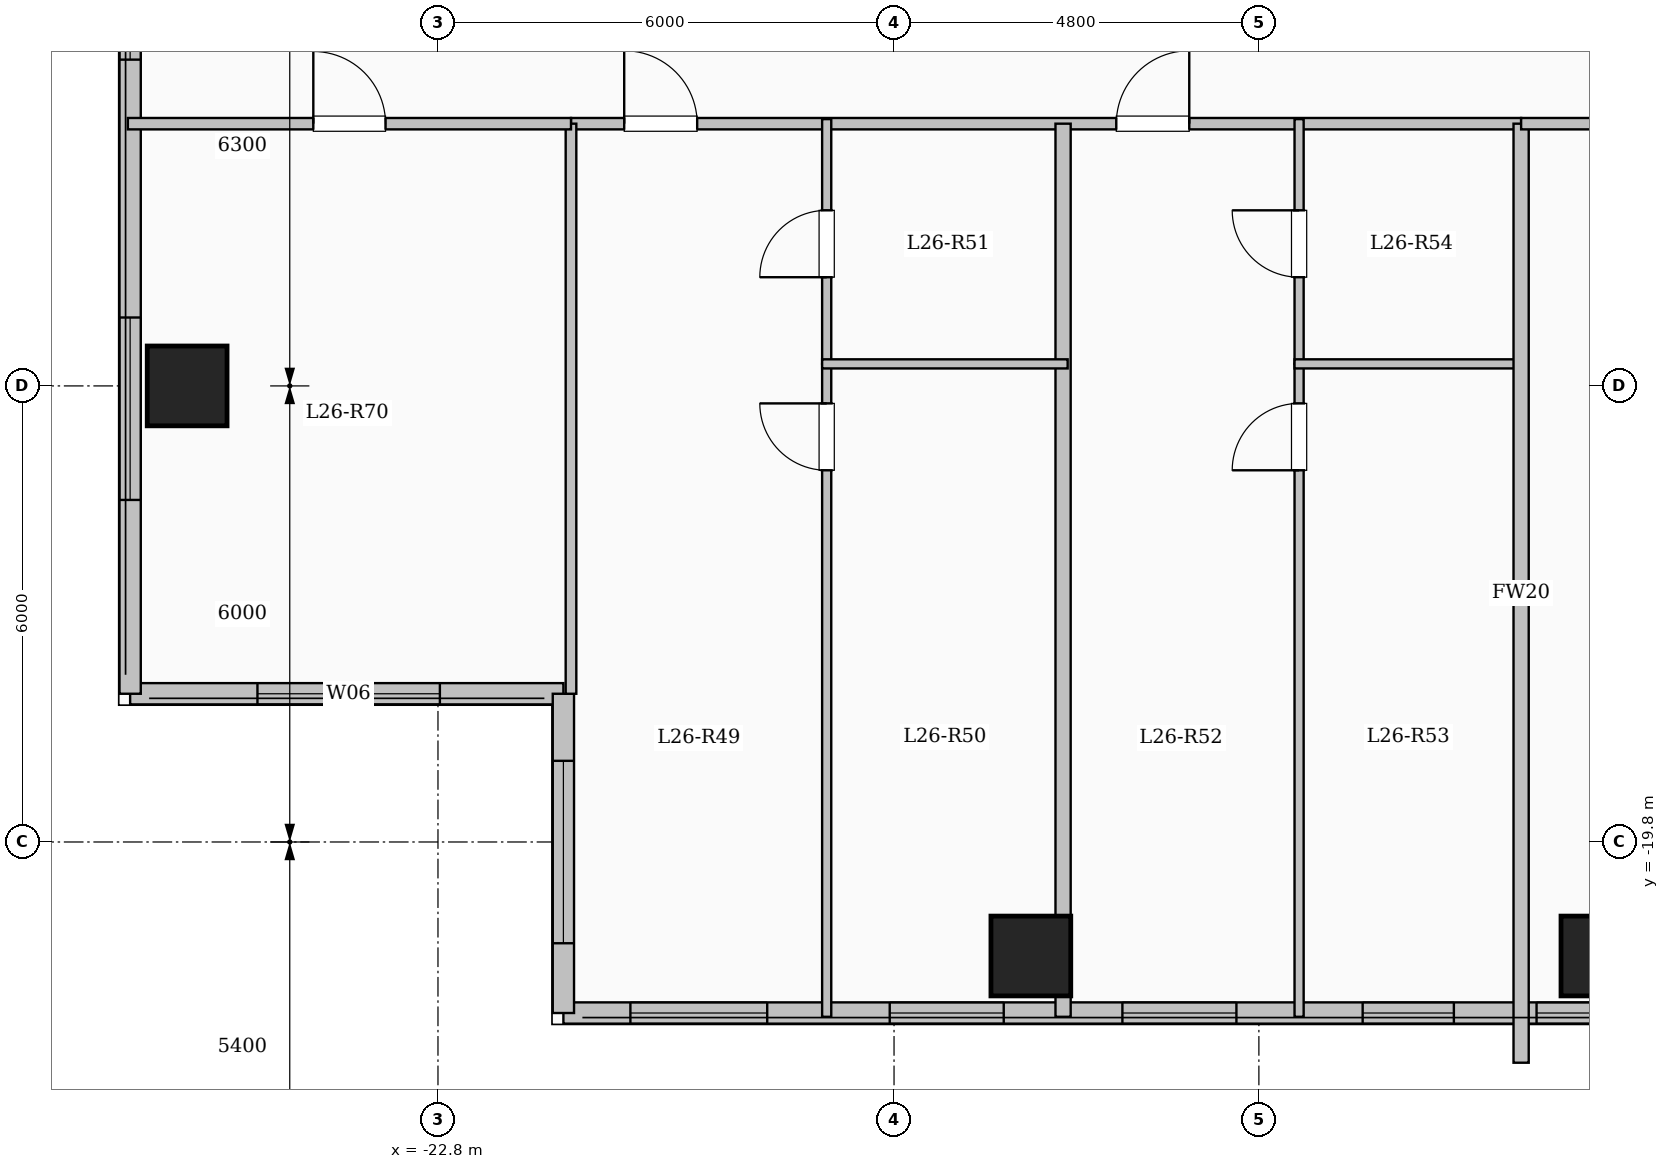
"""IFC4 building model, lengths in metres.
Left out: names, types, materials, properties, quantities, classifications, styles, units other than length and angle.
Written with IfcOpenShell. Run it as: python <this file> out.ifc"""

import sys

from ifc_helpers import new_model, si_unit, direction, frame, frame_2d, origin, origin_2d, place, context, subcontext, project, spatial, rectangle, extrude, element, fill, save


model = new_model("IFC4")
c1 = context("Model", 3, precision=1e-05, world=origin(), true_north=direction((0.0, 1.0)))
c2 = subcontext(c1, "Body", "Model", "MODEL_VIEW")
j1 = project(units=[si_unit("LENGTHUNIT", "METRE"), si_unit("PLANEANGLEUNIT", "RADIAN")], contexts=[c1])
p1 = place(None, origin())
s1 = spatial("IfcSite", under=j1, at=p1, CompositionType="ELEMENT")
p2 = place(p1, origin())
s2 = spatial("IfcBuilding", under=s1, at=p2, CompositionType="ELEMENT")
p3 = place(p2, frame((0.0, 0.0, 98.4)))
s3 = spatial("IfcBuildingStorey", under=s2, at=p3, CompositionType="ELEMENT", Elevation=98.4)
for number, where, z_axis, x_axis in (
    (1, (-15.0, -21.3, 0.0), (0.0, 0.0, 1.0), (1.0, 0.0, 0.0)),
    (2, (-7.5, -21.3, 0.0), (0.0, 0.0, 1.0), (1.0, 0.0, 0.0)),
    (3, (-26.1, -13.8, 0.0), (0.0, 0.0, 1.0), (1.0, 0.0, 0.0)),
):
    element("IfcColumn", number, at=place(p3, frame(where, z_axis=z_axis, x_axis=x_axis)), inside=s3, PredefinedType="COLUMN", context=c2, shape_type="SweptSolid", body=[
        extrude(rectangle(XDim=1.05, YDim=1.05, at=origin_2d()), origin(), (0.0, 0.0, 1.0), 3.35),
    ])
p4 = place(p3, frame((-21.15, -17.85, 0.0), z_axis=(0.0, 0.0, 1.0), x_axis=(-1.0, 0.0, 0.0)))
e4 = element("IfcWall", 4, at=p4, inside=s3, PredefinedType="SOLIDWALL", context=c2, shape_type="SweptSolid", body=[
    extrude(rectangle(XDim=5.7, YDim=0.28, at=frame_2d((2.85, 0.0))), origin(), (0.0, 0.0, 1.0), 3.1),
])
p5 = place(p4, frame((1.625, 0.0, 0.9)))
e5 = element("IfcOpeningElement", 5, at=p5, cuts=e4, PredefinedType="OPENING", context=c2, shape_type="SweptSolid", body=[
    extrude(rectangle(XDim=2.4, YDim=1.8, at=frame_2d((1.2, 0.9))), frame((0.0, 0.15, 0.0), z_axis=(0.0, -1.0, 0.0), x_axis=(1.0, 0.0, 0.0)), (0.0, 0.0, 1.0), 0.3),
])
p6 = place(p3, frame((-26.85, -17.85, 0.0), z_axis=(0.0, 0.0, 1.0), x_axis=(0.0, 1.0, 0.0)))
e6 = element("IfcWall", 6, at=p6, inside=s3, PredefinedType="SOLIDWALL", context=c2, shape_type="SweptSolid", body=[
    extrude(rectangle(XDim=35.7, YDim=0.28, at=frame_2d((17.85, 0.0))), origin(), (0.0, 0.0, 1.0), 3.1),
])
p7 = place(p6, frame((2.55, 0.0, 0.9)))
e7 = element("IfcOpeningElement", 7, at=p7, cuts=e6, PredefinedType="OPENING", context=c2, shape_type="SweptSolid", body=[
    extrude(rectangle(XDim=2.4, YDim=1.8, at=frame_2d((1.2, 0.9))), frame((0.0, 0.15, 0.0), z_axis=(0.0, -1.0, 0.0), x_axis=(1.0, 0.0, 0.0)), (0.0, 0.0, 1.0), 0.3),
])
p8 = place(p6, frame((8.343, 0.0, 0.9)))
e8 = element("IfcOpeningElement", 8, at=p8, cuts=e6, PredefinedType="OPENING", context=c2, shape_type="SweptSolid", body=[
    extrude(rectangle(XDim=1.5, YDim=1.65, at=frame_2d((0.75, 0.825))), frame((0.0, 0.15, 0.0), z_axis=(0.0, -1.0, 0.0), x_axis=(1.0, 0.0, 0.0)), (0.0, 0.0, 1.0), 0.3),
])
p9 = place(p6, frame((18.6, 0.0, 0.9)))
e9 = element("IfcOpeningElement", 9, at=p9, cuts=e6, PredefinedType="OPENING", context=c2, shape_type="SweptSolid", body=[
    extrude(rectangle(XDim=2.0, YDim=1.7, at=frame_2d((1.0, 0.85))), frame((0.0, 0.15, 0.0), z_axis=(0.0, -1.0, 0.0), x_axis=(1.0, 0.0, 0.0)), (0.0, 0.0, 1.0), 0.3),
])
p10 = place(p6, frame((28.975, 0.0, 0.95)))
e10 = element("IfcOpeningElement", 10, at=p10, cuts=e6, PredefinedType="OPENING", context=c2, shape_type="SweptSolid", body=[
    extrude(rectangle(XDim=1.0, YDim=1.5, at=frame_2d((0.5, 0.75))), frame((0.0, 0.15, 0.0), z_axis=(0.0, -1.0, 0.0), x_axis=(1.0, 0.0, 0.0)), (0.0, 0.0, 1.0), 0.3),
])
p11 = place(p6, frame((32.025, 0.0, 0.9)))
e11 = element("IfcOpeningElement", 11, at=p11, cuts=e6, PredefinedType="OPENING", context=c2, shape_type="SweptSolid", body=[
    extrude(rectangle(XDim=2.0, YDim=1.7, at=frame_2d((1.0, 0.85))), frame((0.0, 0.15, 0.0), z_axis=(0.0, -1.0, 0.0), x_axis=(1.0, 0.0, 0.0)), (0.0, 0.0, 1.0), 0.3),
])
p12 = place(p3, frame((-7.35, -22.05, 0.0), z_axis=(0.0, 0.0, 1.0), x_axis=(-1.0, 0.0, 0.0)))
e12 = element("IfcWall", 12, at=p12, inside=s3, PredefinedType="SOLIDWALL", context=c2, shape_type="SweptSolid", body=[
    extrude(rectangle(XDim=13.8, YDim=0.28, at=frame_2d((6.9, 0.0))), origin(), (0.0, 0.0, 1.0), 3.1),
])
p13 = place(p12, frame((0.147, 0.0, 0.95)))
e13 = element("IfcOpeningElement", 13, at=p13, cuts=e12, PredefinedType="OPENING", context=c2, shape_type="SweptSolid", body=[
    extrude(rectangle(XDim=0.85, YDim=1.5, at=frame_2d((0.425, 0.75))), frame((0.0, 0.15, 0.0), z_axis=(0.0, -1.0, 0.0), x_axis=(1.0, 0.0, 0.0)), (0.0, 0.0, 1.0), 0.3),
])
p14 = place(p12, frame((2.085, 0.0, 0.95)))
e14 = element("IfcOpeningElement", 14, at=p14, cuts=e12, PredefinedType="OPENING", context=c2, shape_type="SweptSolid", body=[
    extrude(rectangle(XDim=1.2, YDim=1.5, at=frame_2d((0.6, 0.75))), frame((0.0, 0.15, 0.0), z_axis=(0.0, -1.0, 0.0), x_axis=(1.0, 0.0, 0.0)), (0.0, 0.0, 1.0), 0.3),
])
p15 = place(p12, frame((4.946, 0.0, 0.9)))
e15 = element("IfcOpeningElement", 15, at=p15, cuts=e12, PredefinedType="OPENING", context=c2, shape_type="SweptSolid", body=[
    extrude(rectangle(XDim=1.5, YDim=1.65, at=frame_2d((0.75, 0.825))), frame((0.0, 0.15, 0.0), z_axis=(0.0, -1.0, 0.0), x_axis=(1.0, 0.0, 0.0)), (0.0, 0.0, 1.0), 0.3),
])
p16 = place(p12, frame((8.007, 0.0, 0.9)))
e16 = element("IfcOpeningElement", 16, at=p16, cuts=e12, PredefinedType="OPENING", context=c2, shape_type="SweptSolid", body=[
    extrude(rectangle(XDim=1.5, YDim=1.65, at=frame_2d((0.75, 0.825))), frame((0.0, 0.15, 0.0), z_axis=(0.0, -1.0, 0.0), x_axis=(1.0, 0.0, 0.0)), (0.0, 0.0, 1.0), 0.3),
])
p17 = place(p12, frame((11.118, 0.0, 0.9)))
e17 = element("IfcOpeningElement", 17, at=p17, cuts=e12, PredefinedType="OPENING", context=c2, shape_type="SweptSolid", body=[
    extrude(rectangle(XDim=1.8, YDim=1.65, at=frame_2d((0.9, 0.825))), frame((0.0, 0.15, 0.0), z_axis=(0.0, -1.0, 0.0), x_axis=(1.0, 0.0, 0.0)), (0.0, 0.0, 1.0), 0.3),
])
p18 = place(p3, frame((-21.15, -22.05, 0.0), z_axis=(0.0, 0.0, 1.0), x_axis=(0.0, 1.0, 0.0)))
e18 = element("IfcWall", 18, at=p18, inside=s3, PredefinedType="SOLIDWALL", context=c2, shape_type="SweptSolid", body=[
    extrude(rectangle(XDim=4.2, YDim=0.28, at=frame_2d((2.1, 0.0))), origin(), (0.0, 0.0, 1.0), 3.1),
])
p19 = place(p18, frame((0.918, 0.0, 0.9)))
e19 = element("IfcOpeningElement", 19, at=p19, cuts=e18, PredefinedType="OPENING", context=c2, shape_type="SweptSolid", body=[
    extrude(rectangle(XDim=2.4, YDim=1.8, at=frame_2d((1.2, 0.9))), frame((0.0, 0.15, 0.0), z_axis=(0.0, -1.0, 0.0), x_axis=(1.0, 0.0, 0.0)), (0.0, 0.0, 1.0), 0.3),
])
p20 = place(p3, frame((-21.05, -10.35, 0.0), z_axis=(0.0, 0.0, 1.0), x_axis=(1.0, 0.0, 0.0)))
e20 = element("IfcWall", 20, at=p20, inside=s3, PredefinedType="PARTITIONING", context=c2, shape_type="SweptSolid", body=[
    extrude(rectangle(XDim=12.5, YDim=0.15, at=frame_2d((6.25, 0.0))), origin(), (0.0, 0.0, 1.0), 3.1),
])
p21 = place(p20, frame((0.7, 0.0, 0.0)))
e21 = element("IfcOpeningElement", 21, at=p21, cuts=e20, PredefinedType="OPENING", context=c2, shape_type="SweptSolid", body=[
    extrude(rectangle(XDim=0.96, YDim=2.15, at=frame_2d((0.48, 1.075))), frame((0.0, 0.085, 0.0), z_axis=(0.0, -1.0, 0.0), x_axis=(1.0, 0.0, 0.0)), (0.0, 0.0, 1.0), 0.17),
])
p22 = place(p20, frame((7.174, 0.0, 0.0)))
e22 = element("IfcOpeningElement", 22, at=p22, cuts=e20, PredefinedType="OPENING", context=c2, shape_type="SweptSolid", body=[
    extrude(rectangle(XDim=0.96, YDim=2.15, at=frame_2d((0.48, 1.075))), frame((0.0, 0.085, 0.0), z_axis=(0.0, -1.0, 0.0), x_axis=(1.0, 0.0, 0.0)), (0.0, 0.0, 1.0), 0.17),
])
p23 = place(p3, frame((-14.576, -22.1, 0.0), z_axis=(0.0, 0.0, 1.0), x_axis=(0.0, 1.0, 0.0)))
e23 = element("IfcWall", 23, at=p23, inside=s3, PredefinedType="SOLIDWALL", context=c2, shape_type="SweptSolid", body=[
    extrude(rectangle(XDim=11.75, YDim=0.2, at=frame_2d((5.875, 0.0))), origin(), (0.0, 0.0, 1.0), 3.1),
])
p24 = place(p3, frame((-17.686, -22.1, 0.0), z_axis=(0.0, 0.0, 1.0), x_axis=(0.0, 1.0, 0.0)))
e24 = element("IfcWall", 24, at=p24, inside=s3, PredefinedType="PARTITIONING", context=c2, shape_type="SweptSolid", body=[
    extrude(rectangle(XDim=8.59, YDim=0.12, at=frame_2d((4.295, 0.0))), origin(), (0.0, 0.0, 1.0), 3.1),
])
p25 = place(p24, frame((7.19, 0.0, 0.0)))
e25 = element("IfcOpeningElement", 25, at=p25, cuts=e24, PredefinedType="OPENING", context=c2, shape_type="SweptSolid", body=[
    extrude(rectangle(XDim=0.88, YDim=2.1, at=frame_2d((0.44, 1.05))), frame((0.0, 0.07, 0.0), z_axis=(0.0, -1.0, 0.0), x_axis=(1.0, 0.0, 0.0)), (0.0, 0.0, 1.0), 0.14),
])
p26 = place(p3, frame((-17.686, -13.51, 0.0), z_axis=(0.0, 0.0, 1.0), x_axis=(0.0, 1.0, 0.0)))
e26 = element("IfcWall", 26, at=p26, inside=s3, PredefinedType="PARTITIONING", context=c2, shape_type="SweptSolid", body=[
    extrude(rectangle(XDim=3.22, YDim=0.12, at=frame_2d((1.61, 0.0))), origin(), (0.0, 0.0, 1.0), 3.1),
])
p27 = place(p26, frame((1.14, 0.0, 0.0)))
e27 = element("IfcOpeningElement", 27, at=p27, cuts=e26, PredefinedType="OPENING", context=c2, shape_type="SweptSolid", body=[
    extrude(rectangle(XDim=0.88, YDim=2.1, at=frame_2d((0.44, 1.05))), frame((0.0, 0.07, 0.0), z_axis=(0.0, -1.0, 0.0), x_axis=(1.0, 0.0, 0.0)), (0.0, 0.0, 1.0), 0.14),
])
p28 = place(p3, frame((-17.746, -13.51, 0.0), z_axis=(0.0, 0.0, 1.0), x_axis=(1.0, 0.0, 0.0)))
e28 = element("IfcWall", 28, at=p28, inside=s3, PredefinedType="PARTITIONING", context=c2, shape_type="SweptSolid", body=[
    extrude(rectangle(XDim=3.23, YDim=0.12, at=frame_2d((1.615, 0.0))), origin(), (0.0, 0.0, 1.0), 3.1),
])
p29 = place(p3, frame((-11.471, -22.1, 0.0), z_axis=(0.0, 0.0, 1.0), x_axis=(0.0, 1.0, 0.0)))
e29 = element("IfcWall", 29, at=p29, inside=s3, PredefinedType="PARTITIONING", context=c2, shape_type="SweptSolid", body=[
    extrude(rectangle(XDim=8.59, YDim=0.12, at=frame_2d((4.295, 0.0))), origin(), (0.0, 0.0, 1.0), 3.1),
])
p30 = place(p29, frame((7.19, 0.0, 0.0)))
e30 = element("IfcOpeningElement", 30, at=p30, cuts=e29, PredefinedType="OPENING", context=c2, shape_type="SweptSolid", body=[
    extrude(rectangle(XDim=0.88, YDim=2.1, at=frame_2d((0.44, 1.05))), frame((0.0, 0.07, 0.0), z_axis=(0.0, -1.0, 0.0), x_axis=(1.0, 0.0, 0.0)), (0.0, 0.0, 1.0), 0.14),
])
p31 = place(p3, frame((-11.471, -13.51, 0.0), z_axis=(0.0, 0.0, 1.0), x_axis=(0.0, 1.0, 0.0)))
e31 = element("IfcWall", 31, at=p31, inside=s3, PredefinedType="PARTITIONING", context=c2, shape_type="SweptSolid", body=[
    extrude(rectangle(XDim=3.22, YDim=0.12, at=frame_2d((1.61, 0.0))), origin(), (0.0, 0.0, 1.0), 3.1),
])
p32 = place(p31, frame((1.14, 0.0, 0.0)))
e32 = element("IfcOpeningElement", 32, at=p32, cuts=e31, PredefinedType="OPENING", context=c2, shape_type="SweptSolid", body=[
    extrude(rectangle(XDim=0.88, YDim=2.1, at=frame_2d((0.44, 1.05))), frame((0.0, 0.07, 0.0), z_axis=(0.0, -1.0, 0.0), x_axis=(1.0, 0.0, 0.0)), (0.0, 0.0, 1.0), 0.14),
])
p33 = place(p3, frame((-11.531, -13.51, 0.0), z_axis=(0.0, 0.0, 1.0), x_axis=(1.0, 0.0, 0.0)))
e33 = element("IfcWall", 33, at=p33, inside=s3, PredefinedType="PARTITIONING", context=c2, shape_type="SweptSolid", body=[
    extrude(rectangle(XDim=2.991, YDim=0.12, at=frame_2d((1.496, 0.0))), origin(), (0.0, 0.0, 1.0), 3.1),
])
p34 = place(p3, frame((-8.55, -22.704, 0.0), z_axis=(0.0, 0.0, 1.0), x_axis=(0.0, 1.0, 0.0)))
e34 = element("IfcWall", 34, at=p34, inside=s3, PredefinedType="SOLIDWALL", context=c2, shape_type="SweptSolid", body=[
    extrude(rectangle(XDim=12.354, YDim=0.2, at=frame_2d((6.177, 0.0))), origin(), (0.0, 0.0, 1.0), 3.1),
])
p35 = place(p3, frame((-8.55, -10.35, 0.0), z_axis=(0.0, 0.0, 1.0), x_axis=(1.0, 0.0, 0.0)))
e35 = element("IfcWall", 35, at=p35, inside=s3, PredefinedType="PARTITIONING", context=c2, shape_type="SweptSolid", body=[
    extrude(rectangle(XDim=17.1, YDim=0.15, at=frame_2d((8.55, 0.0))), origin(), (0.0, 0.0, 1.0), 3.1),
])
p36 = place(p35, frame((1.6, 0.0, 0.0)))
e36 = element("IfcOpeningElement", 36, at=p36, cuts=e35, PredefinedType="OPENING", context=c2, shape_type="SweptSolid", body=[
    extrude(rectangle(XDim=0.95, YDim=2.15, at=frame_2d((0.475, 1.075))), frame((0.0, 0.085, 0.0), z_axis=(0.0, -1.0, 0.0), x_axis=(1.0, 0.0, 0.0)), (0.0, 0.0, 1.0), 0.17),
])
p37 = place(p35, frame((10.5, 0.0, 0.0)))
e37 = element("IfcOpeningElement", 37, at=p37, cuts=e35, PredefinedType="OPENING", context=c2, shape_type="SweptSolid", body=[
    extrude(rectangle(XDim=0.95, YDim=2.15, at=frame_2d((0.475, 1.075))), frame((0.0, 0.085, 0.0), z_axis=(0.0, -1.0, 0.0), x_axis=(1.0, 0.0, 0.0)), (0.0, 0.0, 1.0), 0.17),
])
p38 = place(p3, frame((-21.05, -17.85, 0.0), z_axis=(0.0, 0.0, 1.0), x_axis=(0.0, 1.0, 0.0)))
e38 = element("IfcWall", 38, at=p38, inside=s3, PredefinedType="PARTITIONING", context=c2, shape_type="SweptSolid", body=[
    extrude(rectangle(XDim=7.5, YDim=0.14, at=frame_2d((3.75, 0.0))), origin(), (0.0, 0.0, 1.0), 3.1),
])
p39 = place(p3, frame((-26.88, -10.35, 0.0), z_axis=(0.0, 0.0, 1.0), x_axis=(1.0, 0.0, 0.0)))
e39 = element("IfcWall", 39, at=p39, inside=s3, PredefinedType="PARTITIONING", context=c2, shape_type="SweptSolid", body=[
    extrude(rectangle(XDim=5.83, YDim=0.15, at=frame_2d((2.915, 0.0))), origin(), (0.0, 0.0, 1.0), 3.1),
])
p40 = place(p39, frame((2.44, 0.0, 0.0)))
e40 = element("IfcOpeningElement", 40, at=p40, cuts=e39, PredefinedType="OPENING", context=c2, shape_type="SweptSolid", body=[
    extrude(rectangle(XDim=0.95, YDim=2.15, at=frame_2d((0.475, 1.075))), frame((0.0, 0.085, 0.0), z_axis=(0.0, -1.0, 0.0), x_axis=(1.0, 0.0, 0.0)), (0.0, 0.0, 1.0), 0.17),
])
p41 = place(p5, origin())
e41 = element("IfcWindow", 41, at=p41, inside=s3, PartitioningType="SINGLE_PANEL", PredefinedType="WINDOW", context=c2, shape_type="SweptSolid", body=[
    extrude(rectangle(XDim=2.4, YDim=1.8, at=frame_2d((1.2, 0.9))), frame((0.0, 0.03, 0.0), z_axis=(0.0, -1.0, 0.0), x_axis=(1.0, 0.0, 0.0)), (0.0, 0.0, 1.0), 0.06),
])
fill(e5, e41)
p42 = place(p7, origin())
e42 = element("IfcWindow", 42, at=p42, inside=s3, PartitioningType="SINGLE_PANEL", PredefinedType="WINDOW", context=c2, shape_type="SweptSolid", body=[
    extrude(rectangle(XDim=2.4, YDim=1.8, at=frame_2d((1.2, 0.9))), frame((0.0, 0.03, 0.0), z_axis=(0.0, -1.0, 0.0), x_axis=(1.0, 0.0, 0.0)), (0.0, 0.0, 1.0), 0.06),
])
fill(e7, e42)
p43 = place(p8, origin())
e43 = element("IfcWindow", 43, at=p43, inside=s3, PartitioningType="SINGLE_PANEL", PredefinedType="WINDOW", context=c2, shape_type="SweptSolid", body=[
    extrude(rectangle(XDim=1.5, YDim=1.65, at=frame_2d((0.75, 0.825))), frame((0.0, 0.03, 0.0), z_axis=(0.0, -1.0, 0.0), x_axis=(1.0, 0.0, 0.0)), (0.0, 0.0, 1.0), 0.06),
])
fill(e8, e43)
p44 = place(p13, origin())
e44 = element("IfcWindow", 44, at=p44, inside=s3, PartitioningType="SINGLE_PANEL", PredefinedType="WINDOW", context=c2, shape_type="SweptSolid", body=[
    extrude(rectangle(XDim=0.85, YDim=1.5, at=frame_2d((0.425, 0.75))), frame((0.0, 0.03, 0.0), z_axis=(0.0, -1.0, 0.0), x_axis=(1.0, 0.0, 0.0)), (0.0, 0.0, 1.0), 0.06),
])
fill(e13, e44)
p45 = place(p14, origin())
e45 = element("IfcWindow", 45, at=p45, inside=s3, PartitioningType="SINGLE_PANEL", PredefinedType="WINDOW", context=c2, shape_type="SweptSolid", body=[
    extrude(rectangle(XDim=1.2, YDim=1.5, at=frame_2d((0.6, 0.75))), frame((0.0, 0.03, 0.0), z_axis=(0.0, -1.0, 0.0), x_axis=(1.0, 0.0, 0.0)), (0.0, 0.0, 1.0), 0.06),
])
fill(e14, e45)
p46 = place(p15, origin())
e46 = element("IfcWindow", 46, at=p46, inside=s3, PartitioningType="SINGLE_PANEL", PredefinedType="WINDOW", context=c2, shape_type="SweptSolid", body=[
    extrude(rectangle(XDim=1.5, YDim=1.65, at=frame_2d((0.75, 0.825))), frame((0.0, 0.03, 0.0), z_axis=(0.0, -1.0, 0.0), x_axis=(1.0, 0.0, 0.0)), (0.0, 0.0, 1.0), 0.06),
])
fill(e15, e46)
p47 = place(p16, origin())
e47 = element("IfcWindow", 47, at=p47, inside=s3, PartitioningType="SINGLE_PANEL", PredefinedType="WINDOW", context=c2, shape_type="SweptSolid", body=[
    extrude(rectangle(XDim=1.5, YDim=1.65, at=frame_2d((0.75, 0.825))), frame((0.0, 0.03, 0.0), z_axis=(0.0, -1.0, 0.0), x_axis=(1.0, 0.0, 0.0)), (0.0, 0.0, 1.0), 0.06),
])
fill(e16, e47)
p48 = place(p17, origin())
e48 = element("IfcWindow", 48, at=p48, inside=s3, PartitioningType="SINGLE_PANEL", PredefinedType="WINDOW", context=c2, shape_type="SweptSolid", body=[
    extrude(rectangle(XDim=1.8, YDim=1.65, at=frame_2d((0.9, 0.825))), frame((0.0, 0.03, 0.0), z_axis=(0.0, -1.0, 0.0), x_axis=(1.0, 0.0, 0.0)), (0.0, 0.0, 1.0), 0.06),
])
fill(e17, e48)
p49 = place(p19, origin())
e49 = element("IfcWindow", 49, at=p49, inside=s3, PartitioningType="SINGLE_PANEL", PredefinedType="WINDOW", context=c2, shape_type="SweptSolid", body=[
    extrude(rectangle(XDim=2.4, YDim=1.8, at=frame_2d((1.2, 0.9))), frame((0.0, 0.03, 0.0), z_axis=(0.0, -1.0, 0.0), x_axis=(1.0, 0.0, 0.0)), (0.0, 0.0, 1.0), 0.06),
])
fill(e19, e49)
p50 = place(p21, origin())
e50 = element("IfcDoor", 50, at=p50, inside=s3, OperationType="SINGLE_SWING_LEFT", PredefinedType="DOOR", context=c2, shape_type="SweptSolid", body=[
    extrude(rectangle(XDim=0.96, YDim=2.15, at=frame_2d((0.48, 1.075))), frame((0.0, 0.025, 0.0), z_axis=(0.0, -1.0, 0.0), x_axis=(1.0, 0.0, 0.0)), (0.0, 0.0, 1.0), 0.05),
])
fill(e21, e50)
p51 = place(p25, origin())
e51 = element("IfcDoor", 51, at=p51, inside=s3, OperationType="SINGLE_SWING_RIGHT", PredefinedType="DOOR", context=c2, shape_type="SweptSolid", body=[
    extrude(rectangle(XDim=0.88, YDim=2.1, at=frame_2d((0.44, 1.05))), frame((0.0, 0.025, 0.0), z_axis=(0.0, -1.0, 0.0), x_axis=(1.0, 0.0, 0.0)), (0.0, 0.0, 1.0), 0.05),
])
fill(e25, e51)
p52 = place(p27, origin())
e52 = element("IfcDoor", 52, at=p52, inside=s3, OperationType="SINGLE_SWING_LEFT", PredefinedType="DOOR", context=c2, shape_type="SweptSolid", body=[
    extrude(rectangle(XDim=0.88, YDim=2.1, at=frame_2d((0.44, 1.05))), frame((0.0, 0.025, 0.0), z_axis=(0.0, -1.0, 0.0), x_axis=(1.0, 0.0, 0.0)), (0.0, 0.0, 1.0), 0.05),
])
fill(e27, e52)
p53 = place(p22, origin())
e53 = element("IfcDoor", 53, at=p53, inside=s3, OperationType="SINGLE_SWING_RIGHT", PredefinedType="DOOR", context=c2, shape_type="SweptSolid", body=[
    extrude(rectangle(XDim=0.96, YDim=2.15, at=frame_2d((0.48, 1.075))), frame((0.0, 0.025, 0.0), z_axis=(0.0, -1.0, 0.0), x_axis=(1.0, 0.0, 0.0)), (0.0, 0.0, 1.0), 0.05),
])
fill(e22, e53)
p54 = place(p30, origin())
e54 = element("IfcDoor", 54, at=p54, inside=s3, OperationType="SINGLE_SWING_LEFT", PredefinedType="DOOR", context=c2, shape_type="SweptSolid", body=[
    extrude(rectangle(XDim=0.88, YDim=2.1, at=frame_2d((0.44, 1.05))), frame((0.0, 0.025, 0.0), z_axis=(0.0, -1.0, 0.0), x_axis=(1.0, 0.0, 0.0)), (0.0, 0.0, 1.0), 0.05),
])
fill(e30, e54)
p55 = place(p32, origin())
e55 = element("IfcDoor", 55, at=p55, inside=s3, OperationType="SINGLE_SWING_RIGHT", PredefinedType="DOOR", context=c2, shape_type="SweptSolid", body=[
    extrude(rectangle(XDim=0.88, YDim=2.1, at=frame_2d((0.44, 1.05))), frame((0.0, 0.025, 0.0), z_axis=(0.0, -1.0, 0.0), x_axis=(1.0, 0.0, 0.0)), (0.0, 0.0, 1.0), 0.05),
])
fill(e32, e55)
p56 = place(p40, origin())
e56 = element("IfcDoor", 56, at=p56, inside=s3, OperationType="SINGLE_SWING_LEFT", PredefinedType="DOOR", context=c2, shape_type="SweptSolid", body=[
    extrude(rectangle(XDim=0.95, YDim=2.15, at=frame_2d((0.475, 1.075))), frame((0.0, 0.025, 0.0), z_axis=(0.0, -1.0, 0.0), x_axis=(1.0, 0.0, 0.0)), (0.0, 0.0, 1.0), 0.05),
])
fill(e40, e56)
save(model, sys.argv[1])
